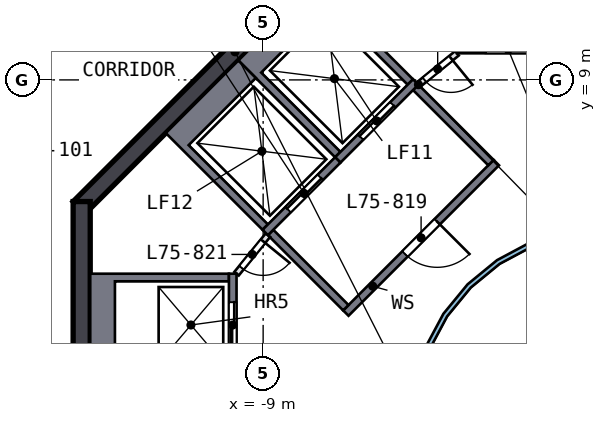
"""IFC4 building model, lengths in metres.
Left out: names, types, materials, properties, quantities, classifications, styles, units other than length and angle.
Written with IfcOpenShell. Run it as: python <this file> out.ifc"""

import sys

from ifc_helpers import new_model, si_unit, direction, frame, frame_2d, origin, place, context, subcontext, project, spatial, polyline, rectangle, outline, extrude, element, fill, save


model = new_model("IFC4")
c1 = context("Model", 3, precision=1e-05, world=origin(), true_north=direction((0.0, 1.0)))
c2 = subcontext(c1, "Body", "Model", "MODEL_VIEW")
j1 = project(units=[si_unit("LENGTHUNIT", "METRE"), si_unit("PLANEANGLEUNIT", "RADIAN")], contexts=[c1])
p1 = place(None, origin())
s1 = spatial("IfcSite", under=j1, at=p1, CompositionType="ELEMENT")
p2 = place(p1, origin())
s2 = spatial("IfcBuilding", under=s1, at=p2, CompositionType="ELEMENT")
p3 = place(p2, frame((0.0, 0.0, 303.0)))
s3 = spatial("IfcBuildingStorey", under=s2, at=p3, CompositionType="ELEMENT", Elevation=303.0)
p4 = place(p3, frame((-5.64, 13.841, 0.0), z_axis=(0.0, 0.0, 1.0), x_axis=(-0.707106781, -0.707106781, 0.0)))
e1 = element("IfcWall", 1, at=p4, inside=s3, PredefinedType="SHEAR", context=c2, shape_type="SweptSolid", body=[
    extrude(rectangle(XDim=11.598, YDim=0.45, at=frame_2d((5.799, 0.0))), origin(), (0.0, 0.0, 1.0), 3.5),
])
p5 = place(p3, frame((-13.775, 5.799, 0.0), z_axis=(0.0, 0.0, 1.0), x_axis=(0.0, -1.0, 0.0)))
e2 = element("IfcWall", 2, at=p5, inside=s3, PredefinedType="SHEAR", context=c2, shape_type="SweptSolid", body=[
    extrude(rectangle(XDim=11.598, YDim=0.45, at=frame_2d((5.799, 0.0))), origin(), (0.0, 0.0, 1.0), 3.5),
])
p6 = place(p5, frame((4.899, 0.0, 0.0)))
e3 = element("IfcOpeningElement", 3, at=p6, cuts=e2, PredefinedType="OPENING", context=c2, shape_type="SweptSolid", body=[
    extrude(rectangle(XDim=1.8, YDim=2.1, at=frame_2d((0.9, 1.05))), frame((0.0, 0.235, 0.0), z_axis=(0.0, -1.0, 0.0), x_axis=(1.0, 0.0, 0.0)), (0.0, 0.0, 1.0), 0.47),
])
p7 = place(p3, frame((-1.2, 9.8, 0.0), z_axis=(0.0, 0.0, 1.0), x_axis=(-1.0, 0.0, 0.0)))
e4 = element("IfcWall", 4, at=p7, inside=s3, PredefinedType="SOLIDWALL", context=c2, shape_type="SweptSolid", body=[
    extrude(rectangle(XDim=2.7, YDim=0.2, at=frame_2d((1.35, 0.0))), origin(), (0.0, 0.0, 1.0), 3.19),
])
p8 = place(p7, frame((0.75, 0.0, 0.0)))
e5 = element("IfcOpeningElement", 5, at=p8, cuts=e4, PredefinedType="OPENING", context=c2, shape_type="SweptSolid", body=[
    extrude(rectangle(XDim=1.2, YDim=2.1, at=frame_2d((0.6, 1.05))), frame((0.0, 0.11, 0.0), z_axis=(0.0, -1.0, 0.0), x_axis=(1.0, 0.0, 0.0)), (0.0, 0.0, 1.0), 0.22),
])
p9 = place(p3, origin())
e6 = element("IfcWall", 6, at=p9, inside=s3, PredefinedType="SOLIDWALL", context=c2, shape_type="SweptSolid", body=[
    extrude(outline(polyline([(-13.55, 3.9), (-9.9, 3.9), (-9.9, 3.7), (-12.9, 3.7), (-12.9, 1.4), (-9.9, 1.4), (-9.9, 1.2), (-13.55, 1.2), (-13.55, 3.9)])), origin(), (0.0, 0.0, 1.0), 3.19),
])
p10 = place(p3, frame((-9.8, 1.2, 0.0), z_axis=(0.0, 0.0, 1.0), x_axis=(0.0, 1.0, 0.0)))
e7 = element("IfcWall", 7, at=p10, inside=s3, PredefinedType="SOLIDWALL", context=c2, shape_type="SweptSolid", body=[
    extrude(rectangle(XDim=2.7, YDim=0.2, at=frame_2d((1.35, 0.0))), origin(), (0.0, 0.0, 1.0), 3.19),
])
p11 = place(p10, frame((0.75, 0.0, 0.0)))
e8 = element("IfcOpeningElement", 8, at=p11, cuts=e7, PredefinedType="OPENING", context=c2, shape_type="SweptSolid", body=[
    extrude(rectangle(XDim=1.2, YDim=2.1, at=frame_2d((0.6, 1.05))), frame((0.0, 0.11, 0.0), z_axis=(0.0, -1.0, 0.0), x_axis=(1.0, 0.0, 0.0)), (0.0, 0.0, 1.0), 0.22),
])
p12 = place(p3, origin())
e9 = element("IfcWall", 9, at=p12, inside=s3, PredefinedType="SOLIDWALL", context=c2, shape_type="SweptSolid", body=[
    extrude(outline(polyline([(-9.652, 9.51), (-7.601, 11.561), (-5.056, 9.016), (-5.197, 8.874), (-7.283, 10.96), (-9.051, 9.192), (-6.965, 7.106), (-7.106, 6.965), (-9.652, 9.51)])), origin(), (0.0, 0.0, 1.0), 3.19),
])
p13 = place(p3, frame((-4.985, 8.945, 0.0), z_axis=(0.0, 0.0, 1.0), x_axis=(-0.707106781, -0.707106781, 0.0)))
e10 = element("IfcWall", 10, at=p13, inside=s3, PredefinedType="SOLIDWALL", context=c2, shape_type="SweptSolid", body=[
    extrude(rectangle(XDim=2.9, YDim=0.2, at=frame_2d((1.45, 0.0))), origin(), (0.0, 0.0, 1.0), 3.19),
])
p14 = place(p13, frame((0.85, 0.0, 0.0)))
e11 = element("IfcOpeningElement", 11, at=p14, cuts=e10, PredefinedType="OPENING", context=c2, shape_type="SweptSolid", body=[
    extrude(rectangle(XDim=1.2, YDim=2.1, at=frame_2d((0.6, 1.05))), frame((0.0, 0.11, 0.0), z_axis=(0.0, -1.0, 0.0), x_axis=(1.0, 0.0, 0.0)), (0.0, 0.0, 1.0), 0.22),
])
p15 = place(p3, origin())
e12 = element("IfcWall", 12, at=p15, inside=s3, PredefinedType="SOLIDWALL", context=c2, shape_type="SweptSolid", body=[
    extrude(outline(polyline([(-11.561, 7.601), (-9.652, 9.51), (-9.192, 9.051), (-10.96, 7.283), (-8.874, 5.197), (-9.016, 5.056), (-11.561, 7.601)])), origin(), (0.0, 0.0, 1.0), 3.19),
])
p16 = place(p3, frame((-7.036, 6.894, 0.0), z_axis=(0.0, 0.0, 1.0), x_axis=(-0.707106781, -0.707106781, 0.0)))
e13 = element("IfcWall", 13, at=p16, inside=s3, PredefinedType="SOLIDWALL", context=c2, shape_type="SweptSolid", body=[
    extrude(rectangle(XDim=2.7, YDim=0.2, at=frame_2d((1.35, 0.0))), origin(), (0.0, 0.0, 1.0), 3.19),
])
p17 = place(p16, frame((0.65, 0.0, 0.0)))
e14 = element("IfcOpeningElement", 14, at=p17, cuts=e13, PredefinedType="OPENING", context=c2, shape_type="SweptSolid", body=[
    extrude(rectangle(XDim=1.2, YDim=2.1, at=frame_2d((0.6, 1.05))), frame((0.0, 0.11, 0.0), z_axis=(0.0, -1.0, 0.0), x_axis=(1.0, 0.0, 0.0)), (0.0, 0.0, 1.0), 0.22),
])
p18 = place(p3, frame((-2.864, 6.823, 0.0), z_axis=(0.0, 0.0, 1.0), x_axis=(-0.707106781, -0.707106781, 0.0)))
e15 = element("IfcWall", 15, at=p18, inside=s3, PredefinedType="SOLIDWALL", context=c2, shape_type="SweptSolid", body=[
    extrude(rectangle(XDim=5.6, YDim=0.2, at=frame_2d((2.8, 0.0))), origin(), (0.0, 0.0, 1.0), 3.19),
])
p19 = place(p18, frame((2.2, 0.0, 0.0)))
e16 = element("IfcOpeningElement", 16, at=p19, cuts=e15, PredefinedType="OPENING", context=c2, shape_type="SweptSolid", body=[
    extrude(rectangle(XDim=1.2, YDim=2.1, at=frame_2d((0.6, 1.05))), frame((0.0, 0.11, 0.0), z_axis=(0.0, -1.0, 0.0), x_axis=(1.0, 0.0, 0.0)), (0.0, 0.0, 1.0), 0.22),
])
for number, where, z_axis, x_axis in (
    (17, (-3.005, 6.823, 0.0), (0.0, 0.0, 1.0), (-0.707, 0.707, 0.0)),
    (18, (-6.823, 3.005, 0.0), (0.0, 0.0, 1.0), (-0.707, 0.707, 0.0)),
):
    element("IfcWall", number, at=place(p3, frame(where, z_axis=z_axis, x_axis=x_axis)), inside=s3, PredefinedType="SOLIDWALL", context=c2, shape_type="SweptSolid", body=[
        extrude(rectangle(XDim=2.8, YDim=0.2, at=frame_2d((1.4, 0.0))), origin(), (0.0, 0.0, 1.0), 3.19),
    ])
p20 = place(p3, frame((-3.9, 9.7, 0.0), z_axis=(0.0, 0.0, 1.0), x_axis=(-0.775559878, -0.631274009, 0.0)))
e19 = element("IfcWall", 19, at=p20, inside=s3, PredefinedType="PARTITIONING", context=c2, shape_type="SweptSolid", body=[
    extrude(rectangle(XDim=1.308, YDim=0.15, at=frame_2d((0.654, 0.0))), origin(), (0.0, 0.0, 1.0), 3.19),
])
p21 = place(p20, frame((0.204, 0.0, 0.0)))
e20 = element("IfcOpeningElement", 20, at=p21, cuts=e19, PredefinedType="OPENING", context=c2, shape_type="SweptSolid", body=[
    extrude(rectangle(XDim=0.9, YDim=2.1, at=frame_2d((0.45, 1.05))), frame((0.0, 0.085, 0.0), z_axis=(0.0, -1.0, 0.0), x_axis=(1.0, 0.0, 0.0)), (0.0, 0.0, 1.0), 0.17),
])
p22 = place(p3, frame((-8.874, 4.914, 0.0), z_axis=(0.0, 0.0, 1.0), x_axis=(-0.631274009, -0.775559878, 0.0)))
e21 = element("IfcWall", 21, at=p22, inside=s3, PredefinedType="PARTITIONING", context=c2, shape_type="SweptSolid", body=[
    extrude(rectangle(XDim=1.308, YDim=0.15, at=frame_2d((0.654, 0.0))), origin(), (0.0, 0.0, 1.0), 3.19),
])
p23 = place(p22, frame((0.204, 0.0, 0.0)))
e22 = element("IfcOpeningElement", 22, at=p23, cuts=e21, PredefinedType="OPENING", context=c2, shape_type="SweptSolid", body=[
    extrude(rectangle(XDim=0.9, YDim=2.1, at=frame_2d((0.45, 1.05))), frame((0.0, 0.085, 0.0), z_axis=(0.0, -1.0, 0.0), x_axis=(1.0, 0.0, 0.0)), (0.0, 0.0, 1.0), 0.17),
])
p24 = place(p3, origin())
e23 = element("IfcWall", 23, at=p24, inside=s3, PredefinedType="SOLIDWALL", context=c2, shape_type="SweptSolid", body=[
    extrude(outline(polyline([(5.021, -0.999), (4.73, -1.959), (4.257, -2.844), (3.62, -3.62), (2.844, -4.257), (1.959, -4.73), (0.999, -5.021), (0.0, -5.12), (-0.999, -5.021), (-1.959, -4.73), (-2.844, -4.257), (-3.62, -3.62), (-4.257, -2.844), (-4.73, -1.959), (-5.021, -0.999), (-5.12, 0.0), (-5.021, 0.999), (-4.73, 1.959), (-4.257, 2.844), (-3.62, 3.62), (-2.844, 4.257), (-1.959, 4.73), (-0.999, 5.021), (0.0, 5.12), (0.999, 5.021), (1.959, 4.73), (2.844, 4.257), (3.62, 3.62), (4.257, 2.844), (4.73, 1.959), (5.021, 0.999), (5.12, 0.0), (5.021, -0.999)]), holes=[polyline([(4.904, 0.976), (4.619, 1.913), (4.157, 2.778), (3.535, 3.535), (2.778, 4.157), (1.913, 4.619), (0.976, 4.904), (0.0, 5.0), (-0.976, 4.904), (-1.913, 4.619), (-2.778, 4.157), (-3.535, 3.535), (-4.157, 2.778), (-4.619, 1.913), (-4.904, 0.976), (-5.0, 0.0), (-4.904, -0.976), (-4.619, -1.913), (-4.157, -2.778), (-3.535, -3.535), (-2.778, -4.157), (-1.913, -4.619), (-0.976, -4.904), (0.0, -5.0), (0.976, -4.904), (1.913, -4.619), (2.778, -4.157), (3.535, -3.535), (4.157, -2.778), (4.619, -1.913), (4.904, -0.976), (5.0, 0.0), (4.904, 0.976)])]), origin(), (0.0, 0.0, 1.0), 3.19),
])
p25 = place(p3, frame((-18.17, 2.8, 0.0), z_axis=(0.0, 0.0, 1.0), x_axis=(0.402913126, 0.915238227, 0.0)))
e24 = element("IfcWall", 24, at=p25, inside=s3, PredefinedType="SOLIDWALL", context=c2, shape_type="SweptSolid", body=[
    extrude(rectangle(XDim=9.517, YDim=0.2, at=frame_2d((4.758, 0.0))), origin(), (0.0, 0.0, 1.0), 3.19),
])
p26 = place(p25, frame((3.835, 0.0, 0.0)))
e25 = element("IfcOpeningElement", 25, at=p26, cuts=e24, PredefinedType="OPENING", context=c2, shape_type="SweptSolid", body=[
    extrude(rectangle(XDim=1.8, YDim=2.1, at=frame_2d((0.9, 1.05))), frame((0.0, 0.11, 0.0), z_axis=(0.0, -1.0, 0.0), x_axis=(1.0, 0.0, 0.0)), (0.0, 0.0, 1.0), 0.22),
])
p27 = place(p11, origin())
e26 = element("IfcDoor", 26, at=p27, inside=s3, OperationType="DOUBLE_DOOR_SLIDING", PredefinedType="DOOR", context=c2, shape_type="SweptSolid", body=[
    extrude(rectangle(XDim=1.2, YDim=2.1, at=frame_2d((0.6, 1.05))), frame((0.0, 0.025, 0.0), z_axis=(0.0, -1.0, 0.0), x_axis=(1.0, 0.0, 0.0)), (0.0, 0.0, 1.0), 0.05),
])
fill(e8, e26)
p28 = place(p14, origin())
e27 = element("IfcDoor", 27, at=p28, inside=s3, OperationType="DOUBLE_DOOR_SLIDING", PredefinedType="DOOR", context=c2, shape_type="SweptSolid", body=[
    extrude(rectangle(XDim=1.2, YDim=2.1, at=frame_2d((0.6, 1.05))), frame((0.0, 0.025, 0.0), z_axis=(0.0, -1.0, 0.0), x_axis=(1.0, 0.0, 0.0)), (0.0, 0.0, 1.0), 0.05),
])
fill(e11, e27)
p29 = place(p17, origin())
e28 = element("IfcDoor", 28, at=p29, inside=s3, OperationType="DOUBLE_DOOR_SLIDING", PredefinedType="DOOR", context=c2, shape_type="SweptSolid", body=[
    extrude(rectangle(XDim=1.2, YDim=2.1, at=frame_2d((0.6, 1.05))), frame((0.0, 0.025, 0.0), z_axis=(0.0, -1.0, 0.0), x_axis=(1.0, 0.0, 0.0)), (0.0, 0.0, 1.0), 0.05),
])
fill(e14, e28)
p30 = place(p19, origin())
e29 = element("IfcDoor", 29, at=p30, inside=s3, OperationType="SINGLE_SWING_LEFT", PredefinedType="DOOR", context=c2, shape_type="SweptSolid", body=[
    extrude(rectangle(XDim=1.2, YDim=2.1, at=frame_2d((0.6, 1.05))), frame((0.0, 0.025, 0.0), z_axis=(0.0, -1.0, 0.0), x_axis=(1.0, 0.0, 0.0)), (0.0, 0.0, 1.0), 0.05),
])
fill(e16, e29)
p31 = place(p21, origin())
e30 = element("IfcDoor", 30, at=p31, inside=s3, OperationType="SINGLE_SWING_LEFT", PredefinedType="DOOR", context=c2, shape_type="SweptSolid", body=[
    extrude(rectangle(XDim=0.9, YDim=2.1, at=frame_2d((0.45, 1.05))), frame((0.0, 0.025, 0.0), z_axis=(0.0, -1.0, 0.0), x_axis=(1.0, 0.0, 0.0)), (0.0, 0.0, 1.0), 0.05),
])
fill(e20, e30)
p32 = place(p23, origin())
e31 = element("IfcDoor", 31, at=p32, inside=s3, OperationType="SINGLE_SWING_LEFT", PredefinedType="DOOR", context=c2, shape_type="SweptSolid", body=[
    extrude(rectangle(XDim=0.9, YDim=2.1, at=frame_2d((0.45, 1.05))), frame((0.0, 0.025, 0.0), z_axis=(0.0, -1.0, 0.0), x_axis=(1.0, 0.0, 0.0)), (0.0, 0.0, 1.0), 0.05),
])
fill(e22, e31)
save(model, sys.argv[1])
